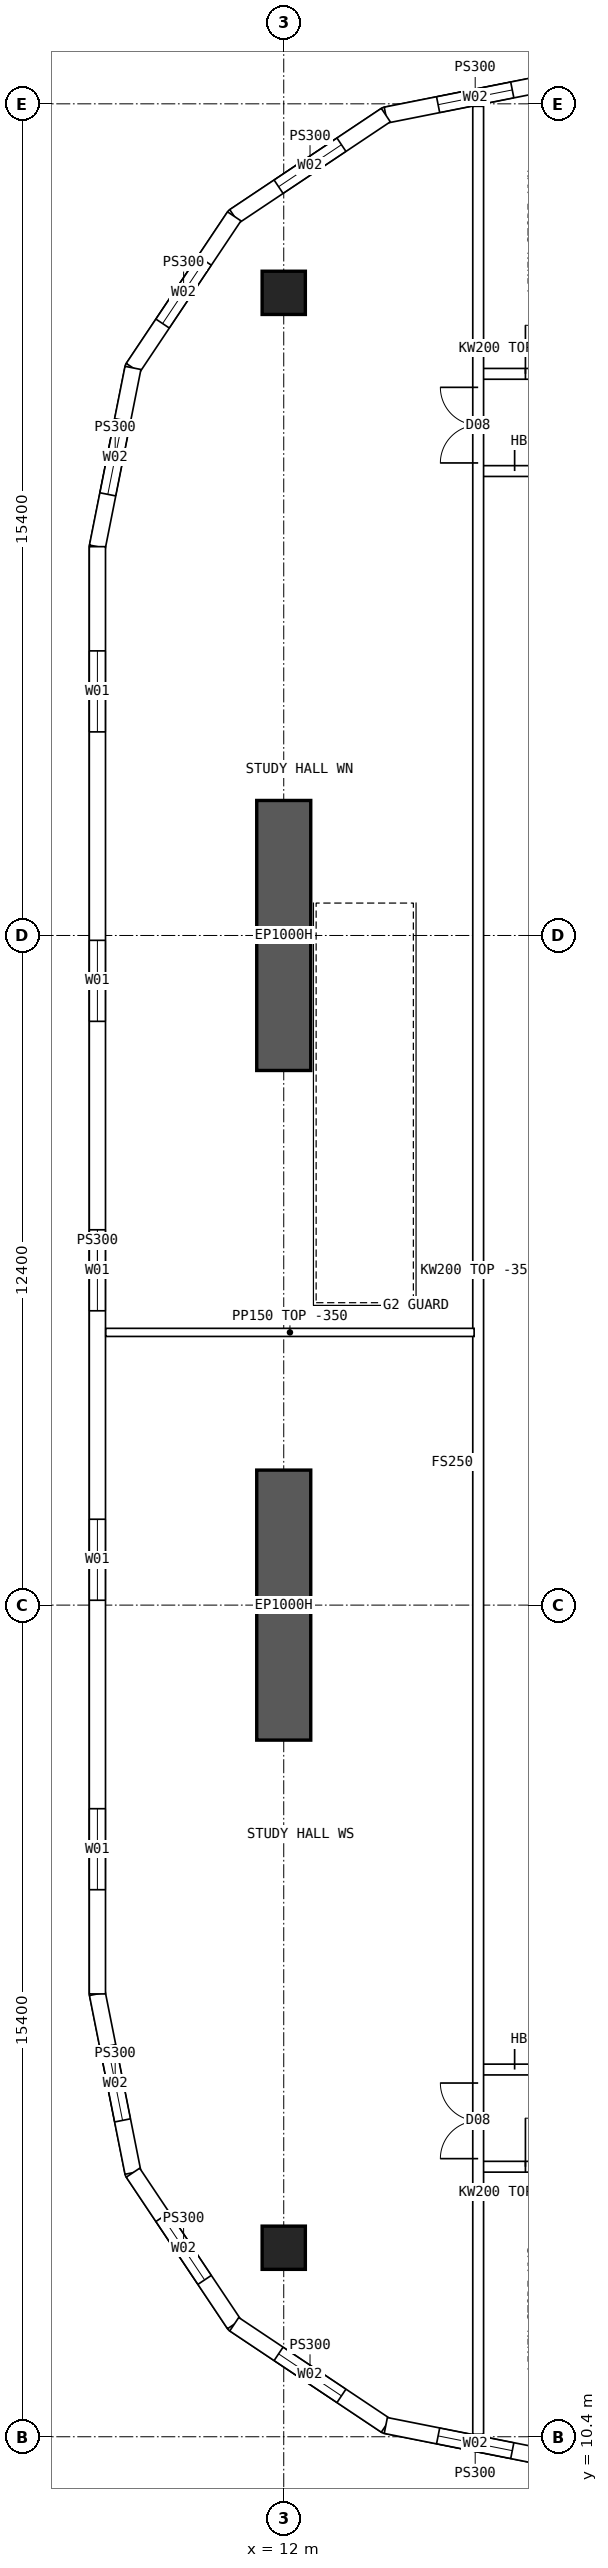
"""IFC4 building model, lengths in metres.
Left out: names, types, materials, properties, quantities, classifications, styles, units other than length and angle.
Written with IfcOpenShell. Run it as: python <this file> out.ifc"""

import sys

from ifc_helpers import new_model, si_unit, direction, frame, frame_2d, origin, origin_2d, place, context, subcontext, project, spatial, polyline, rectangle, hollow_rectangle, outline, extrude, element, fill, save


model = new_model("IFC4")
c1 = context("Model", 3, precision=1e-05, world=origin(), true_north=direction((0.0, 1.0)))
c2 = subcontext(c1, "Body", "Model", "MODEL_VIEW")
j1 = project(units=[si_unit("LENGTHUNIT", "METRE"), si_unit("PLANEANGLEUNIT", "RADIAN")], contexts=[c1])
p1 = place(None, origin())
s1 = spatial("IfcSite", under=j1, at=p1, CompositionType="ELEMENT")
p2 = place(p1, origin())
s2 = spatial("IfcBuilding", under=s1, at=p2, CompositionType="ELEMENT")
p3 = place(p2, frame((0.0, 0.0, 197.35)))
s3 = spatial("IfcBuildingStorey", under=s2, at=p3, CompositionType="ELEMENT", Elevation=197.35)
for number, where, z_axis, x_axis in (
    (1, (12.0, 13.9, 0.0), (0.0, 0.0, 1.0), (1.0, 0.0, 0.0)),
    (2, (12.0, 50.1, 0.0), (0.0, 0.0, 1.0), (1.0, 0.0, 0.0)),
):
    element("IfcColumn", number, at=place(p3, frame(where, z_axis=z_axis, x_axis=x_axis)), inside=s3, PredefinedType="COLUMN", context=c2, shape_type="SweptSolid", body=[
        extrude(hollow_rectangle(XDim=0.8, YDim=0.8, WallThickness=0.08, at=origin_2d()), origin(), (0.0, 0.0, 1.0), 3.75),
    ])
for number, where, z_axis, x_axis in (
    (3, (12.0, 23.3, 0.0), (0.0, 0.0, 1.0), (0.0, 1.0, 0.0)),
    (4, (12.0, 35.7, 0.0), (0.0, 0.0, 1.0), (0.0, 1.0, 0.0)),
):
    element("IfcWall", number, at=place(p3, frame(where, z_axis=z_axis, x_axis=x_axis)), inside=s3, PredefinedType="SHEAR", context=c2, shape_type="SweptSolid", body=[
        extrude(rectangle(XDim=5.0, YDim=1.0, at=frame_2d((2.5, 0.0))), origin(), (0.0, 0.0, 1.0), 3.75),
    ])
p4 = place(p3, frame((8.55, 45.4, 0.0), z_axis=(0.0, 0.0, 1.0), x_axis=(0.0, -1.0, 0.0)))
e5 = element("IfcWall", 5, at=p4, inside=s3, PredefinedType="SOLIDWALL", context=c2, shape_type="SweptSolid", body=[
    extrude(outline(polyline([(-0.015, -0.15), (26.815, -0.15), (26.785, 0.15), (0.015, 0.15), (-0.015, -0.15)])), origin(), (0.0, 0.0, 1.0), 3.4),
])
p5 = place(p4, frame((1.93, 0.0, 0.9)))
e6 = element("IfcOpeningElement", 6, at=p5, cuts=e5, PredefinedType="OPENING", context=c2, shape_type="SweptSolid", body=[
    extrude(rectangle(XDim=1.5, YDim=2.0, at=frame_2d((0.75, 1.0))), frame((0.0, 0.16, 0.0), z_axis=(0.0, -1.0, 0.0), x_axis=(1.0, 0.0, 0.0)), (0.0, 0.0, 1.0), 0.32),
])
p6 = place(p4, frame((7.29, 0.0, 0.9)))
e7 = element("IfcOpeningElement", 7, at=p6, cuts=e5, PredefinedType="OPENING", context=c2, shape_type="SweptSolid", body=[
    extrude(rectangle(XDim=1.5, YDim=2.0, at=frame_2d((0.75, 1.0))), frame((0.0, 0.16, 0.0), z_axis=(0.0, -1.0, 0.0), x_axis=(1.0, 0.0, 0.0)), (0.0, 0.0, 1.0), 0.32),
])
p7 = place(p4, frame((12.65, 0.0, 0.9)))
e8 = element("IfcOpeningElement", 8, at=p7, cuts=e5, PredefinedType="OPENING", context=c2, shape_type="SweptSolid", body=[
    extrude(rectangle(XDim=1.5, YDim=2.0, at=frame_2d((0.75, 1.0))), frame((0.0, 0.16, 0.0), z_axis=(0.0, -1.0, 0.0), x_axis=(1.0, 0.0, 0.0)), (0.0, 0.0, 1.0), 0.32),
])
p8 = place(p4, frame((18.01, 0.0, 0.9)))
e9 = element("IfcOpeningElement", 9, at=p8, cuts=e5, PredefinedType="OPENING", context=c2, shape_type="SweptSolid", body=[
    extrude(rectangle(XDim=1.5, YDim=2.0, at=frame_2d((0.75, 1.0))), frame((0.0, 0.16, 0.0), z_axis=(0.0, -1.0, 0.0), x_axis=(1.0, 0.0, 0.0)), (0.0, 0.0, 1.0), 0.32),
])
p9 = place(p4, frame((23.37, 0.0, 0.9)))
e10 = element("IfcOpeningElement", 10, at=p9, cuts=e5, PredefinedType="OPENING", context=c2, shape_type="SweptSolid", body=[
    extrude(rectangle(XDim=1.5, YDim=2.0, at=frame_2d((0.75, 1.0))), frame((0.0, 0.16, 0.0), z_axis=(0.0, -1.0, 0.0), x_axis=(1.0, 0.0, 0.0)), (0.0, 0.0, 1.0), 0.32),
])
p10 = place(p3, frame((17.2, 54.05, 0.0), z_axis=(0.0, 0.0, 1.0), x_axis=(-0.98078325777, -0.195100490205, 0.0)))
e11 = element("IfcWall", 11, at=p10, inside=s3, PredefinedType="SOLIDWALL", context=c2, shape_type="SweptSolid", body=[
    extrude(outline(polyline([(-0.03, -0.15), (3.405, -0.15), (3.345, 0.15), (0.03, 0.15), (-0.03, -0.15)])), origin(), (0.0, 0.0, 1.0), 3.4),
])
p11 = place(p10, frame((0.988, 0.0, 0.9)))
e12 = element("IfcOpeningElement", 12, at=p11, cuts=e11, PredefinedType="OPENING", context=c2, shape_type="SweptSolid", body=[
    extrude(rectangle(XDim=1.4, YDim=1.8, at=frame_2d((0.7, 0.9))), frame((0.0, 0.16, 0.0), z_axis=(0.0, -1.0, 0.0), x_axis=(1.0, 0.0, 0.0)), (0.0, 0.0, 1.0), 0.32),
])
p12 = place(p3, frame((13.89, 53.392, 0.0), z_axis=(0.0, 0.0, 1.0), x_axis=(-0.831493450887, -0.555534554399, 0.0)))
e13 = element("IfcWall", 13, at=p12, inside=s3, PredefinedType="SOLIDWALL", context=c2, shape_type="SweptSolid", body=[
    extrude(outline(polyline([(-0.03, -0.15), (3.405, -0.15), (3.345, 0.15), (0.03, 0.15), (-0.03, -0.15)])), origin(), (0.0, 0.0, 1.0), 3.4),
])
p13 = place(p12, frame((0.988, 0.0, 0.9)))
e14 = element("IfcOpeningElement", 14, at=p13, cuts=e13, PredefinedType="OPENING", context=c2, shape_type="SweptSolid", body=[
    extrude(rectangle(XDim=1.4, YDim=1.8, at=frame_2d((0.7, 0.9))), frame((0.0, 0.16, 0.0), z_axis=(0.0, -1.0, 0.0), x_axis=(1.0, 0.0, 0.0)), (0.0, 0.0, 1.0), 0.32),
])
p14 = place(p3, frame((11.083, 51.517, 0.0), z_axis=(0.0, 0.0, 1.0), x_axis=(-0.555534554399, -0.831493450887, 0.0)))
e15 = element("IfcWall", 15, at=p14, inside=s3, PredefinedType="SOLIDWALL", context=c2, shape_type="SweptSolid", body=[
    extrude(outline(polyline([(-0.03, -0.15), (3.405, -0.15), (3.345, 0.15), (0.03, 0.15), (-0.03, -0.15)])), origin(), (0.0, 0.0, 1.0), 3.4),
])
p15 = place(p14, frame((0.988, 0.0, 0.9)))
e16 = element("IfcOpeningElement", 16, at=p15, cuts=e15, PredefinedType="OPENING", context=c2, shape_type="SweptSolid", body=[
    extrude(rectangle(XDim=1.4, YDim=1.8, at=frame_2d((0.7, 0.9))), frame((0.0, 0.16, 0.0), z_axis=(0.0, -1.0, 0.0), x_axis=(1.0, 0.0, 0.0)), (0.0, 0.0, 1.0), 0.32),
])
p16 = place(p3, frame((9.208, 48.71, 0.0), z_axis=(0.0, 0.0, 1.0), x_axis=(-0.19508664885, -0.980786011034, 0.0)))
e17 = element("IfcWall", 17, at=p16, inside=s3, PredefinedType="SOLIDWALL", context=c2, shape_type="SweptSolid", body=[
    extrude(outline(polyline([(-0.03, -0.15), (3.39, -0.15), (3.36, 0.15), (0.03, 0.15), (-0.03, -0.15)])), origin(), (0.0, 0.0, 1.0), 3.4),
])
p17 = place(p16, frame((0.988, 0.0, 0.9)))
e18 = element("IfcOpeningElement", 18, at=p17, cuts=e17, PredefinedType="OPENING", context=c2, shape_type="SweptSolid", body=[
    extrude(rectangle(XDim=1.4, YDim=1.8, at=frame_2d((0.7, 0.9))), frame((0.0, 0.16, 0.0), z_axis=(0.0, -1.0, 0.0), x_axis=(1.0, 0.0, 0.0)), (0.0, 0.0, 1.0), 0.32),
])
p18 = place(p3, frame((8.55, 18.6, 0.0), z_axis=(0.0, 0.0, 1.0), x_axis=(0.19508664885, -0.980786011034, 0.0)))
e19 = element("IfcWall", 19, at=p18, inside=s3, PredefinedType="SOLIDWALL", context=c2, shape_type="SweptSolid", body=[
    extrude(outline(polyline([(-0.015, -0.15), (3.405, -0.15), (3.345, 0.15), (0.015, 0.15), (-0.015, -0.15)])), origin(), (0.0, 0.0, 1.0), 3.4),
])
p19 = place(p18, frame((0.988, 0.0, 0.9)))
e20 = element("IfcOpeningElement", 20, at=p19, cuts=e19, PredefinedType="OPENING", context=c2, shape_type="SweptSolid", body=[
    extrude(rectangle(XDim=1.4, YDim=1.8, at=frame_2d((0.7, 0.9))), frame((0.0, 0.16, 0.0), z_axis=(0.0, -1.0, 0.0), x_axis=(1.0, 0.0, 0.0)), (0.0, 0.0, 1.0), 0.32),
])
p20 = place(p3, frame((9.208, 15.29, 0.0), z_axis=(0.0, 0.0, 1.0), x_axis=(0.555534554399, -0.831493450887, 0.0)))
e21 = element("IfcWall", 21, at=p20, inside=s3, PredefinedType="SOLIDWALL", context=c2, shape_type="SweptSolid", body=[
    extrude(outline(polyline([(-0.03, -0.15), (3.405, -0.15), (3.345, 0.15), (0.03, 0.15), (-0.03, -0.15)])), origin(), (0.0, 0.0, 1.0), 3.4),
])
p21 = place(p20, frame((0.988, 0.0, 0.9)))
e22 = element("IfcOpeningElement", 22, at=p21, cuts=e21, PredefinedType="OPENING", context=c2, shape_type="SweptSolid", body=[
    extrude(rectangle(XDim=1.4, YDim=1.8, at=frame_2d((0.7, 0.9))), frame((0.0, 0.16, 0.0), z_axis=(0.0, -1.0, 0.0), x_axis=(1.0, 0.0, 0.0)), (0.0, 0.0, 1.0), 0.32),
])
p22 = place(p3, frame((11.083, 12.483, 0.0), z_axis=(0.0, 0.0, 1.0), x_axis=(0.831493450887, -0.555534554399, 0.0)))
e23 = element("IfcWall", 23, at=p22, inside=s3, PredefinedType="SOLIDWALL", context=c2, shape_type="SweptSolid", body=[
    extrude(outline(polyline([(-0.03, -0.15), (3.405, -0.15), (3.345, 0.15), (0.03, 0.15), (-0.03, -0.15)])), origin(), (0.0, 0.0, 1.0), 3.4),
])
p23 = place(p22, frame((0.988, 0.0, 0.9)))
e24 = element("IfcOpeningElement", 24, at=p23, cuts=e23, PredefinedType="OPENING", context=c2, shape_type="SweptSolid", body=[
    extrude(rectangle(XDim=1.4, YDim=1.8, at=frame_2d((0.7, 0.9))), frame((0.0, 0.16, 0.0), z_axis=(0.0, -1.0, 0.0), x_axis=(1.0, 0.0, 0.0)), (0.0, 0.0, 1.0), 0.32),
])
p24 = place(p3, frame((13.89, 10.608, 0.0), z_axis=(0.0, 0.0, 1.0), x_axis=(0.98078325777, -0.195100490205, 0.0)))
e25 = element("IfcWall", 25, at=p24, inside=s3, PredefinedType="SOLIDWALL", context=c2, shape_type="SweptSolid", body=[
    extrude(outline(polyline([(-0.03, -0.15), (3.405, -0.15), (3.345, 0.15), (0.03, 0.15), (-0.03, -0.15)])), origin(), (0.0, 0.0, 1.0), 3.4),
])
p25 = place(p24, frame((0.988, 0.0, 0.9)))
e26 = element("IfcOpeningElement", 26, at=p25, cuts=e25, PredefinedType="OPENING", context=c2, shape_type="SweptSolid", body=[
    extrude(rectangle(XDim=1.4, YDim=1.8, at=frame_2d((0.7, 0.9))), frame((0.0, 0.16, 0.0), z_axis=(0.0, -1.0, 0.0), x_axis=(1.0, 0.0, 0.0)), (0.0, 0.0, 1.0), 0.32),
])
p26 = place(p3, frame((15.6, 15.4, 0.0), z_axis=(0.0, 0.0, 1.0), x_axis=(1.0, 0.0, 0.0)))
e27 = element("IfcWall", 27, at=p26, inside=s3, PredefinedType="SOLIDWALL", context=c2, shape_type="SweptSolid", body=[
    extrude(rectangle(XDim=1.975, YDim=0.2, at=frame_2d((0.987, 0.0))), origin(), (0.0, 0.0, 1.0), 3.4),
])
p27 = place(p26, frame((0.875, 0.0, 0.0)))
e28 = element("IfcOpeningElement", 28, at=p27, cuts=e27, PredefinedType="OPENING", context=c2, shape_type="SweptSolid", body=[
    extrude(rectangle(XDim=0.9, YDim=2.1, at=frame_2d((0.45, 1.05))), frame((0.0, 0.11, 0.0), z_axis=(0.0, -1.0, 0.0), x_axis=(1.0, 0.0, 0.0)), (0.0, 0.0, 1.0), 0.22),
])
p28 = place(p3, frame((15.6, 17.2, 0.0), z_axis=(0.0, 0.0, 1.0), x_axis=(1.0, 0.0, 0.0)))
e29 = element("IfcWall", 29, at=p28, inside=s3, PredefinedType="SOLIDWALL", context=c2, shape_type="SweptSolid", body=[
    extrude(rectangle(XDim=1.975, YDim=0.2, at=frame_2d((0.987, 0.0))), origin(), (0.0, 0.0, 1.0), 3.4),
])
p29 = place(p28, frame((0.675, 0.0, 0.0)))
e30 = element("IfcOpeningElement", 30, at=p29, cuts=e29, PredefinedType="OPENING", context=c2, shape_type="SweptSolid", body=[
    extrude(rectangle(XDim=1.2, YDim=2.1, at=frame_2d((0.6, 1.05))), frame((0.0, 0.11, 0.0), z_axis=(0.0, -1.0, 0.0), x_axis=(1.0, 0.0, 0.0)), (0.0, 0.0, 1.0), 0.22),
])
p30 = place(p3, frame((15.6, 48.6, 0.0), z_axis=(0.0, 0.0, 1.0), x_axis=(1.0, 0.0, 0.0)))
e31 = element("IfcWall", 31, at=p30, inside=s3, PredefinedType="SOLIDWALL", context=c2, shape_type="SweptSolid", body=[
    extrude(rectangle(XDim=1.975, YDim=0.2, at=frame_2d((0.987, 0.0))), origin(), (0.0, 0.0, 1.0), 3.4),
])
p31 = place(p30, frame((0.875, 0.0, 0.0)))
e32 = element("IfcOpeningElement", 32, at=p31, cuts=e31, PredefinedType="OPENING", context=c2, shape_type="SweptSolid", body=[
    extrude(rectangle(XDim=0.9, YDim=2.1, at=frame_2d((0.45, 1.05))), frame((0.0, 0.11, 0.0), z_axis=(0.0, -1.0, 0.0), x_axis=(1.0, 0.0, 0.0)), (0.0, 0.0, 1.0), 0.22),
])
p32 = place(p3, frame((15.6, 46.8, 0.0), z_axis=(0.0, 0.0, 1.0), x_axis=(1.0, 0.0, 0.0)))
e33 = element("IfcWall", 33, at=p32, inside=s3, PredefinedType="SOLIDWALL", context=c2, shape_type="SweptSolid", body=[
    extrude(rectangle(XDim=1.975, YDim=0.2, at=frame_2d((0.987, 0.0))), origin(), (0.0, 0.0, 1.0), 3.4),
])
p33 = place(p32, frame((0.675, 0.0, 0.0)))
e34 = element("IfcOpeningElement", 34, at=p33, cuts=e33, PredefinedType="OPENING", context=c2, shape_type="SweptSolid", body=[
    extrude(rectangle(XDim=1.2, YDim=2.1, at=frame_2d((0.6, 1.05))), frame((0.0, 0.11, 0.0), z_axis=(0.0, -1.0, 0.0), x_axis=(1.0, 0.0, 0.0)), (0.0, 0.0, 1.0), 0.22),
])
p34 = place(p3, frame((8.705, 30.85, 0.0), z_axis=(0.0, 0.0, 1.0), x_axis=(1.0, 0.0, 0.0)))
e35 = element("IfcWall", 35, at=p34, inside=s3, PredefinedType="PARTITIONING", context=c2, shape_type="SweptSolid", body=[
    extrude(outline(polyline([(0.0, 0.0), (6.82, 0.0), (6.82, 3.4), (3.597, 3.4), (3.595, 2.95), (2.997, 2.95), (2.995, 3.4), (0.0, 3.4), (0.0, 0.0)])), frame((0.0, 0.075, 0.0), z_axis=(0.0, -1.0, 0.0), x_axis=(1.0, 0.0, 0.0)), (0.0, 0.0, 1.0), 0.15),
])
p35 = place(p3, frame((15.6, 10.446, 0.0), z_axis=(0.0, 0.0, 1.0), x_axis=(0.0, 1.0, 0.0)))
e36 = element("IfcWall", 36, at=p35, inside=s3, PredefinedType="SOLIDWALL", context=c2, shape_type="SweptSolid", body=[
    extrude(rectangle(XDim=43.107, YDim=0.2, at=frame_2d((21.554, 0.0))), origin(), (0.0, 0.0, 1.0), 3.4),
])
p36 = place(p35, frame((5.104, 0.0, 0.0)))
e37 = element("IfcOpeningElement", 37, at=p36, cuts=e36, PredefinedType="OPENING", context=c2, shape_type="SweptSolid", body=[
    extrude(rectangle(XDim=1.4, YDim=2.1, at=frame_2d((0.7, 1.05))), frame((0.0, 0.11, 0.0), z_axis=(0.0, -1.0, 0.0), x_axis=(1.0, 0.0, 0.0)), (0.0, 0.0, 1.0), 0.22),
])
p37 = place(p35, frame((36.504, 0.0, 0.0)))
e38 = element("IfcOpeningElement", 38, at=p37, cuts=e36, PredefinedType="OPENING", context=c2, shape_type="SweptSolid", body=[
    extrude(rectangle(XDim=1.4, YDim=2.1, at=frame_2d((0.7, 1.05))), frame((0.0, 0.11, 0.0), z_axis=(0.0, -1.0, 0.0), x_axis=(1.0, 0.0, 0.0)), (0.0, 0.0, 1.0), 0.22),
])
p38 = place(p5, origin())
e39 = element("IfcWindow", 39, at=p38, inside=s3, PartitioningType="SINGLE_PANEL", PredefinedType="WINDOW", context=c2, shape_type="SweptSolid", body=[
    extrude(rectangle(XDim=1.5, YDim=2.0, at=frame_2d((0.75, 1.0))), frame((0.0, 0.03, 0.0), z_axis=(0.0, -1.0, 0.0), x_axis=(1.0, 0.0, 0.0)), (0.0, 0.0, 1.0), 0.06),
])
fill(e6, e39)
p39 = place(p6, origin())
e40 = element("IfcWindow", 40, at=p39, inside=s3, PartitioningType="SINGLE_PANEL", PredefinedType="WINDOW", context=c2, shape_type="SweptSolid", body=[
    extrude(rectangle(XDim=1.5, YDim=2.0, at=frame_2d((0.75, 1.0))), frame((0.0, 0.03, 0.0), z_axis=(0.0, -1.0, 0.0), x_axis=(1.0, 0.0, 0.0)), (0.0, 0.0, 1.0), 0.06),
])
fill(e7, e40)
p40 = place(p7, origin())
e41 = element("IfcWindow", 41, at=p40, inside=s3, PartitioningType="SINGLE_PANEL", PredefinedType="WINDOW", context=c2, shape_type="SweptSolid", body=[
    extrude(rectangle(XDim=1.5, YDim=2.0, at=frame_2d((0.75, 1.0))), frame((0.0, 0.03, 0.0), z_axis=(0.0, -1.0, 0.0), x_axis=(1.0, 0.0, 0.0)), (0.0, 0.0, 1.0), 0.06),
])
fill(e8, e41)
p41 = place(p8, origin())
e42 = element("IfcWindow", 42, at=p41, inside=s3, PartitioningType="SINGLE_PANEL", PredefinedType="WINDOW", context=c2, shape_type="SweptSolid", body=[
    extrude(rectangle(XDim=1.5, YDim=2.0, at=frame_2d((0.75, 1.0))), frame((0.0, 0.03, 0.0), z_axis=(0.0, -1.0, 0.0), x_axis=(1.0, 0.0, 0.0)), (0.0, 0.0, 1.0), 0.06),
])
fill(e9, e42)
p42 = place(p9, origin())
e43 = element("IfcWindow", 43, at=p42, inside=s3, PartitioningType="SINGLE_PANEL", PredefinedType="WINDOW", context=c2, shape_type="SweptSolid", body=[
    extrude(rectangle(XDim=1.5, YDim=2.0, at=frame_2d((0.75, 1.0))), frame((0.0, 0.03, 0.0), z_axis=(0.0, -1.0, 0.0), x_axis=(1.0, 0.0, 0.0)), (0.0, 0.0, 1.0), 0.06),
])
fill(e10, e43)
p43 = place(p11, origin())
e44 = element("IfcWindow", 44, at=p43, inside=s3, PartitioningType="SINGLE_PANEL", PredefinedType="WINDOW", context=c2, shape_type="SweptSolid", body=[
    extrude(rectangle(XDim=1.4, YDim=1.8, at=frame_2d((0.7, 0.9))), frame((0.0, 0.03, 0.0), z_axis=(0.0, -1.0, 0.0), x_axis=(1.0, 0.0, 0.0)), (0.0, 0.0, 1.0), 0.06),
])
fill(e12, e44)
p44 = place(p13, origin())
e45 = element("IfcWindow", 45, at=p44, inside=s3, PartitioningType="SINGLE_PANEL", PredefinedType="WINDOW", context=c2, shape_type="SweptSolid", body=[
    extrude(rectangle(XDim=1.4, YDim=1.8, at=frame_2d((0.7, 0.9))), frame((0.0, 0.03, 0.0), z_axis=(0.0, -1.0, 0.0), x_axis=(1.0, 0.0, 0.0)), (0.0, 0.0, 1.0), 0.06),
])
fill(e14, e45)
p45 = place(p15, origin())
e46 = element("IfcWindow", 46, at=p45, inside=s3, PartitioningType="SINGLE_PANEL", PredefinedType="WINDOW", context=c2, shape_type="SweptSolid", body=[
    extrude(rectangle(XDim=1.4, YDim=1.8, at=frame_2d((0.7, 0.9))), frame((0.0, 0.03, 0.0), z_axis=(0.0, -1.0, 0.0), x_axis=(1.0, 0.0, 0.0)), (0.0, 0.0, 1.0), 0.06),
])
fill(e16, e46)
p46 = place(p17, origin())
e47 = element("IfcWindow", 47, at=p46, inside=s3, PartitioningType="SINGLE_PANEL", PredefinedType="WINDOW", context=c2, shape_type="SweptSolid", body=[
    extrude(rectangle(XDim=1.4, YDim=1.8, at=frame_2d((0.7, 0.9))), frame((0.0, 0.03, 0.0), z_axis=(0.0, -1.0, 0.0), x_axis=(1.0, 0.0, 0.0)), (0.0, 0.0, 1.0), 0.06),
])
fill(e18, e47)
p47 = place(p19, origin())
e48 = element("IfcWindow", 48, at=p47, inside=s3, PartitioningType="SINGLE_PANEL", PredefinedType="WINDOW", context=c2, shape_type="SweptSolid", body=[
    extrude(rectangle(XDim=1.4, YDim=1.8, at=frame_2d((0.7, 0.9))), frame((0.0, 0.03, 0.0), z_axis=(0.0, -1.0, 0.0), x_axis=(1.0, 0.0, 0.0)), (0.0, 0.0, 1.0), 0.06),
])
fill(e20, e48)
p48 = place(p21, origin())
e49 = element("IfcWindow", 49, at=p48, inside=s3, PartitioningType="SINGLE_PANEL", PredefinedType="WINDOW", context=c2, shape_type="SweptSolid", body=[
    extrude(rectangle(XDim=1.4, YDim=1.8, at=frame_2d((0.7, 0.9))), frame((0.0, 0.03, 0.0), z_axis=(0.0, -1.0, 0.0), x_axis=(1.0, 0.0, 0.0)), (0.0, 0.0, 1.0), 0.06),
])
fill(e22, e49)
p49 = place(p23, origin())
e50 = element("IfcWindow", 50, at=p49, inside=s3, PartitioningType="SINGLE_PANEL", PredefinedType="WINDOW", context=c2, shape_type="SweptSolid", body=[
    extrude(rectangle(XDim=1.4, YDim=1.8, at=frame_2d((0.7, 0.9))), frame((0.0, 0.03, 0.0), z_axis=(0.0, -1.0, 0.0), x_axis=(1.0, 0.0, 0.0)), (0.0, 0.0, 1.0), 0.06),
])
fill(e24, e50)
p50 = place(p25, origin())
e51 = element("IfcWindow", 51, at=p50, inside=s3, PartitioningType="SINGLE_PANEL", PredefinedType="WINDOW", context=c2, shape_type="SweptSolid", body=[
    extrude(rectangle(XDim=1.4, YDim=1.8, at=frame_2d((0.7, 0.9))), frame((0.0, 0.03, 0.0), z_axis=(0.0, -1.0, 0.0), x_axis=(1.0, 0.0, 0.0)), (0.0, 0.0, 1.0), 0.06),
])
fill(e26, e51)
p51 = place(p29, origin())
e52 = element("IfcDoor", 52, at=p51, inside=s3, OperationType="DOUBLE_DOOR_SINGLE_SWING", PredefinedType="DOOR", context=c2, shape_type="SweptSolid", body=[
    extrude(rectangle(XDim=1.2, YDim=2.1, at=frame_2d((0.6, 1.05))), frame((0.0, 0.025, 0.0), z_axis=(0.0, -1.0, 0.0), x_axis=(1.0, 0.0, 0.0)), (0.0, 0.0, 1.0), 0.05),
])
fill(e30, e52)
p52 = place(p33, origin())
e53 = element("IfcDoor", 53, at=p52, inside=s3, OperationType="DOUBLE_DOOR_SINGLE_SWING", PredefinedType="DOOR", context=c2, shape_type="SweptSolid", body=[
    extrude(rectangle(XDim=1.2, YDim=2.1, at=frame_2d((0.6, 1.05))), frame((0.0, 0.025, 0.0), z_axis=(0.0, -1.0, 0.0), x_axis=(1.0, 0.0, 0.0)), (0.0, 0.0, 1.0), 0.05),
])
fill(e34, e53)
p53 = place(p36, origin())
e54 = element("IfcDoor", 54, at=p53, inside=s3, OperationType="DOUBLE_DOOR_SINGLE_SWING", PredefinedType="DOOR", context=c2, shape_type="SweptSolid", body=[
    extrude(rectangle(XDim=1.4, YDim=2.1, at=frame_2d((0.7, 1.05))), frame((0.0, 0.025, 0.0), z_axis=(0.0, -1.0, 0.0), x_axis=(1.0, 0.0, 0.0)), (0.0, 0.0, 1.0), 0.05),
])
fill(e37, e54)
p54 = place(p37, origin())
e55 = element("IfcDoor", 55, at=p54, inside=s3, OperationType="DOUBLE_DOOR_SINGLE_SWING", PredefinedType="DOOR", context=c2, shape_type="SweptSolid", body=[
    extrude(rectangle(XDim=1.4, YDim=2.1, at=frame_2d((0.7, 1.05))), frame((0.0, 0.025, 0.0), z_axis=(0.0, -1.0, 0.0), x_axis=(1.0, 0.0, 0.0)), (0.0, 0.0, 1.0), 0.05),
])
fill(e38, e55)
p55 = place(p27, origin())
e56 = element("IfcDoor", 56, at=p55, inside=s3, OperationType="SINGLE_SWING_LEFT", PredefinedType="DOOR", context=c2, shape_type="SweptSolid", body=[
    extrude(rectangle(XDim=0.9, YDim=2.1, at=frame_2d((0.45, 1.05))), frame((0.0, 0.025, 0.0), z_axis=(0.0, -1.0, 0.0), x_axis=(1.0, 0.0, 0.0)), (0.0, 0.0, 1.0), 0.05),
])
fill(e28, e56)
p56 = place(p31, origin())
e57 = element("IfcDoor", 57, at=p56, inside=s3, OperationType="SINGLE_SWING_LEFT", PredefinedType="DOOR", context=c2, shape_type="SweptSolid", body=[
    extrude(rectangle(XDim=0.9, YDim=2.1, at=frame_2d((0.45, 1.05))), frame((0.0, 0.025, 0.0), z_axis=(0.0, -1.0, 0.0), x_axis=(1.0, 0.0, 0.0)), (0.0, 0.0, 1.0), 0.05),
])
fill(e32, e57)
save(model, sys.argv[1])
